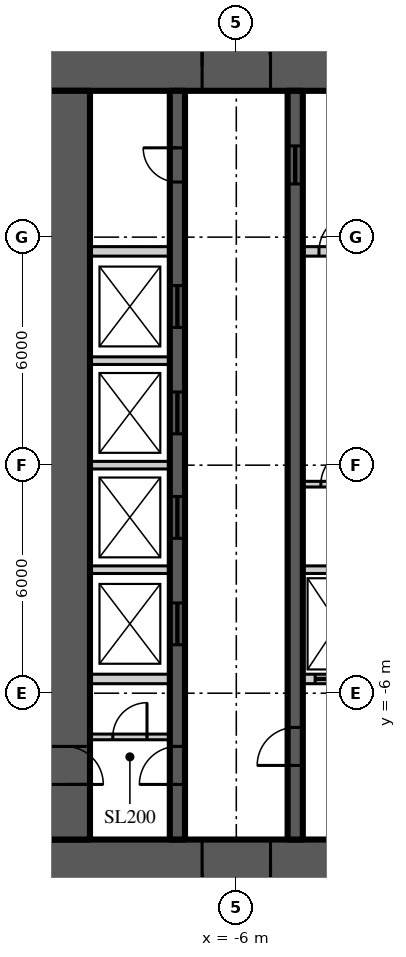
"""IFC4 building model, lengths in metres.
Left out: names, types, materials, properties, quantities, classifications, styles, units other than length and angle.
Written with IfcOpenShell. Run it as: python <this file> out.ifc"""

import sys

from ifc_helpers import new_model, si_unit, direction, frame, frame_2d, origin, place, context, subcontext, project, spatial, rectangle, extrude, element, fill, save


model = new_model("IFC4")
c1 = context("Model", 3, precision=1e-05, world=origin(), true_north=direction((0.0, 1.0)))
c2 = subcontext(c1, "Body", "Model", "MODEL_VIEW")
j1 = project(units=[si_unit("LENGTHUNIT", "METRE"), si_unit("PLANEANGLEUNIT", "RADIAN")], contexts=[c1])
p1 = place(None, origin())
s1 = spatial("IfcSite", under=j1, at=p1, CompositionType="ELEMENT")
p2 = place(p1, origin())
s2 = spatial("IfcBuilding", under=s1, at=p2, CompositionType="ELEMENT")
p3 = place(p2, frame((0.0, 0.0, 55.2)))
s3 = spatial("IfcBuildingStorey", under=s2, at=p3, CompositionType="ELEMENT", Elevation=55.2)
p4 = place(p3, frame((-11.15, 10.5, 0.0), z_axis=(0.0, 0.0, 1.0), x_axis=(1.0, 0.0, 0.0)))
e1 = element("IfcWall", 1, at=p4, inside=s3, PredefinedType="SHEAR", context=c2, shape_type="SweptSolid", body=[
    extrude(rectangle(XDim=22.3, YDim=1.3, at=frame_2d((11.15, 0.0))), origin(), (0.0, 0.0, 1.0), 3.9),
])
p5 = place(p4, frame((4.25, 0.0, 0.0)))
e2 = element("IfcOpeningElement", 2, at=p5, cuts=e1, PredefinedType="OPENING", context=c2, shape_type="SweptSolid", body=[
    extrude(rectangle(XDim=1.8, YDim=2.2, at=frame_2d((0.9, 1.1))), frame((0.0, 0.66, 0.0), z_axis=(0.0, -1.0, 0.0), x_axis=(1.0, 0.0, 0.0)), (0.0, 0.0, 1.0), 1.32),
])
p6 = place(p4, frame((16.25, 0.0, 0.0)))
e3 = element("IfcOpeningElement", 3, at=p6, cuts=e1, PredefinedType="OPENING", context=c2, shape_type="SweptSolid", body=[
    extrude(rectangle(XDim=1.8, YDim=2.2, at=frame_2d((0.9, 1.1))), frame((0.0, 0.66, 0.0), z_axis=(0.0, -1.0, 0.0), x_axis=(1.0, 0.0, 0.0)), (0.0, 0.0, 1.0), 1.32),
])
p7 = place(p3, frame((11.15, -10.5, 0.0), z_axis=(0.0, 0.0, 1.0), x_axis=(-1.0, 0.0, 0.0)))
e4 = element("IfcWall", 4, at=p7, inside=s3, PredefinedType="SHEAR", context=c2, shape_type="SweptSolid", body=[
    extrude(rectangle(XDim=22.3, YDim=1.3, at=frame_2d((11.15, 0.0))), origin(), (0.0, 0.0, 1.0), 3.9),
])
p8 = place(p7, frame((16.25, 0.0, 0.0)))
e5 = element("IfcOpeningElement", 5, at=p8, cuts=e4, PredefinedType="OPENING", context=c2, shape_type="SweptSolid", body=[
    extrude(rectangle(XDim=1.8, YDim=2.2, at=frame_2d((0.9, 1.1))), frame((0.0, 0.66, 0.0), z_axis=(0.0, -1.0, 0.0), x_axis=(1.0, 0.0, 0.0)), (0.0, 0.0, 1.0), 1.32),
])
p9 = place(p7, frame((4.25, 0.0, 0.0)))
e6 = element("IfcOpeningElement", 6, at=p9, cuts=e4, PredefinedType="OPENING", context=c2, shape_type="SweptSolid", body=[
    extrude(rectangle(XDim=1.8, YDim=2.2, at=frame_2d((0.9, 1.1))), frame((0.0, 0.66, 0.0), z_axis=(0.0, -1.0, 0.0), x_axis=(1.0, 0.0, 0.0)), (0.0, 0.0, 1.0), 1.32),
])
p10 = place(p3, frame((-10.5, 9.85, 0.0), z_axis=(0.0, 0.0, 1.0), x_axis=(0.0, -1.0, 0.0)))
e7 = element("IfcWall", 7, at=p10, inside=s3, PredefinedType="SHEAR", context=c2, shape_type="SweptSolid", body=[
    extrude(rectangle(XDim=19.7, YDim=1.3, at=frame_2d((9.85, 0.0))), origin(), (0.0, 0.0, 1.0), 3.9),
])
p11 = place(p10, frame((17.25, 0.0, 0.0)))
e8 = element("IfcOpeningElement", 8, at=p11, cuts=e7, PredefinedType="OPENING", context=c2, shape_type="SweptSolid", body=[
    extrude(rectangle(XDim=1.0, YDim=2.2, at=frame_2d((0.5, 1.1))), frame((0.0, 0.66, 0.0), z_axis=(0.0, -1.0, 0.0), x_axis=(1.0, 0.0, 0.0)), (0.0, 0.0, 1.0), 1.32),
])
p12 = place(p3, frame((-7.55, -9.85, 0.0), z_axis=(0.0, 0.0, 1.0), x_axis=(0.0, 1.0, 0.0)))
e9 = element("IfcWall", 9, at=p12, inside=s3, PredefinedType="SHEAR", context=c2, shape_type="SweptSolid", body=[
    extrude(rectangle(XDim=19.7, YDim=0.4, at=frame_2d((9.85, 0.0))), origin(), (0.0, 0.0, 1.0), 3.9),
])
p13 = place(p12, frame((1.45, 0.0, 0.0)))
e10 = element("IfcOpeningElement", 10, at=p13, cuts=e9, PredefinedType="OPENING", context=c2, shape_type="SweptSolid", body=[
    extrude(rectangle(XDim=1.0, YDim=2.2, at=frame_2d((0.5, 1.1))), frame((0.0, 0.21, 0.0), z_axis=(0.0, -1.0, 0.0), x_axis=(1.0, 0.0, 0.0)), (0.0, 0.0, 1.0), 0.42),
])
p14 = place(p12, frame((17.3, 0.0, 0.0)))
e11 = element("IfcOpeningElement", 11, at=p14, cuts=e9, PredefinedType="OPENING", context=c2, shape_type="SweptSolid", body=[
    extrude(rectangle(XDim=0.9, YDim=2.1, at=frame_2d((0.45, 1.05))), frame((0.0, 0.21, 0.0), z_axis=(0.0, -1.0, 0.0), x_axis=(1.0, 0.0, 0.0)), (0.0, 0.0, 1.0), 0.42),
])
p15 = place(p12, frame((5.125, 0.0, 0.0)))
e12 = element("IfcOpeningElement", 12, at=p15, cuts=e9, PredefinedType="OPENING", context=c2, shape_type="SweptSolid", body=[
    extrude(rectangle(XDim=1.1, YDim=2.2, at=frame_2d((0.55, 1.1))), frame((0.0, 0.21, 0.0), z_axis=(0.0, -1.0, 0.0), x_axis=(1.0, 0.0, 0.0)), (0.0, 0.0, 1.0), 0.42),
])
p16 = place(p12, frame((7.925, 0.0, 0.0)))
e13 = element("IfcOpeningElement", 13, at=p16, cuts=e9, PredefinedType="OPENING", context=c2, shape_type="SweptSolid", body=[
    extrude(rectangle(XDim=1.1, YDim=2.2, at=frame_2d((0.55, 1.1))), frame((0.0, 0.21, 0.0), z_axis=(0.0, -1.0, 0.0), x_axis=(1.0, 0.0, 0.0)), (0.0, 0.0, 1.0), 0.42),
])
p17 = place(p12, frame((10.675, 0.0, 0.0)))
e14 = element("IfcOpeningElement", 14, at=p17, cuts=e9, PredefinedType="OPENING", context=c2, shape_type="SweptSolid", body=[
    extrude(rectangle(XDim=1.1, YDim=2.2, at=frame_2d((0.55, 1.1))), frame((0.0, 0.21, 0.0), z_axis=(0.0, -1.0, 0.0), x_axis=(1.0, 0.0, 0.0)), (0.0, 0.0, 1.0), 0.42),
])
p18 = place(p12, frame((13.475, 0.0, 0.0)))
e15 = element("IfcOpeningElement", 15, at=p18, cuts=e9, PredefinedType="OPENING", context=c2, shape_type="SweptSolid", body=[
    extrude(rectangle(XDim=1.1, YDim=2.2, at=frame_2d((0.55, 1.1))), frame((0.0, 0.21, 0.0), z_axis=(0.0, -1.0, 0.0), x_axis=(1.0, 0.0, 0.0)), (0.0, 0.0, 1.0), 0.42),
])
p19 = place(p3, frame((-4.45, -9.85, 0.0), z_axis=(0.0, 0.0, 1.0), x_axis=(0.0, 1.0, 0.0)))
e16 = element("IfcWall", 16, at=p19, inside=s3, PredefinedType="SHEAR", context=c2, shape_type="SweptSolid", body=[
    extrude(rectangle(XDim=19.7, YDim=0.4, at=frame_2d((9.85, 0.0))), origin(), (0.0, 0.0, 1.0), 3.9),
])
p20 = place(p19, frame((1.95, 0.0, 0.0)))
e17 = element("IfcOpeningElement", 17, at=p20, cuts=e16, PredefinedType="OPENING", context=c2, shape_type="SweptSolid", body=[
    extrude(rectangle(XDim=1.0, YDim=2.2, at=frame_2d((0.5, 1.1))), frame((0.0, 0.21, 0.0), z_axis=(0.0, -1.0, 0.0), x_axis=(1.0, 0.0, 0.0)), (0.0, 0.0, 1.0), 0.42),
])
p21 = place(p19, frame((17.25, 0.0, 0.0)))
e18 = element("IfcOpeningElement", 18, at=p21, cuts=e16, PredefinedType="OPENING", context=c2, shape_type="SweptSolid", body=[
    extrude(rectangle(XDim=1.0, YDim=2.1, at=frame_2d((0.5, 1.05))), frame((0.0, 0.21, 0.0), z_axis=(0.0, -1.0, 0.0), x_axis=(1.0, 0.0, 0.0)), (0.0, 0.0, 1.0), 0.42),
])
p22 = place(p3, frame((-9.85, 5.625, 0.0), z_axis=(0.0, 0.0, 1.0), x_axis=(1.0, 0.0, 0.0)))
e19 = element("IfcWall", 19, at=p22, inside=s3, PredefinedType="SOLIDWALL", context=c2, shape_type="SweptSolid", body=[
    extrude(rectangle(XDim=2.1, YDim=0.25, at=frame_2d((1.05, 0.0))), origin(), (0.0, 0.0, 1.0), 3.7),
])
p23 = place(p3, frame((-4.25, 5.625, 0.0), z_axis=(0.0, 0.0, 1.0), x_axis=(1.0, 0.0, 0.0)))
e20 = element("IfcWall", 20, at=p23, inside=s3, PredefinedType="SOLIDWALL", context=c2, shape_type="SweptSolid", body=[
    extrude(rectangle(XDim=1.85, YDim=0.25, at=frame_2d((0.925, 0.0))), origin(), (0.0, 0.0, 1.0), 3.7),
])
p24 = place(p23, frame((0.425, 0.0, 0.0)))
e21 = element("IfcOpeningElement", 21, at=p24, cuts=e20, PredefinedType="OPENING", context=c2, shape_type="SweptSolid", body=[
    extrude(rectangle(XDim=1.0, YDim=2.2, at=frame_2d((0.5, 1.1))), frame((0.0, 0.135, 0.0), z_axis=(0.0, -1.0, 0.0), x_axis=(1.0, 0.0, 0.0)), (0.0, 0.0, 1.0), 0.27),
])
p25 = place(p3, frame((-9.85, -5.625, 0.0), z_axis=(0.0, 0.0, 1.0), x_axis=(1.0, 0.0, 0.0)))
e22 = element("IfcWall", 22, at=p25, inside=s3, PredefinedType="SOLIDWALL", context=c2, shape_type="SweptSolid", body=[
    extrude(rectangle(XDim=2.1, YDim=0.25, at=frame_2d((1.05, 0.0))), origin(), (0.0, 0.0, 1.0), 3.7),
])
p26 = place(p3, frame((-4.25, -5.625, 0.0), z_axis=(0.0, 0.0, 1.0), x_axis=(1.0, 0.0, 0.0)))
e23 = element("IfcWall", 23, at=p26, inside=s3, PredefinedType="SOLIDWALL", context=c2, shape_type="SweptSolid", body=[
    extrude(rectangle(XDim=1.85, YDim=0.25, at=frame_2d((0.925, 0.0))), origin(), (0.0, 0.0, 1.0), 3.7),
])
p27 = place(p26, frame((0.325, 0.0, 0.0)))
e24 = element("IfcOpeningElement", 24, at=p27, cuts=e23, PredefinedType="OPENING", context=c2, shape_type="SweptSolid", body=[
    extrude(rectangle(XDim=1.2, YDim=2.2, at=frame_2d((0.6, 1.1))), frame((0.0, 0.135, 0.0), z_axis=(0.0, -1.0, 0.0), x_axis=(1.0, 0.0, 0.0)), (0.0, 0.0, 1.0), 0.27),
])
p28 = place(p3, frame((-9.85, -2.75, 0.0), z_axis=(0.0, 0.0, 1.0), x_axis=(1.0, 0.0, 0.0)))
e25 = element("IfcWall", 25, at=p28, inside=s3, PredefinedType="SOLIDWALL", context=c2, shape_type="SweptSolid", body=[
    extrude(rectangle(XDim=2.1, YDim=0.2, at=frame_2d((1.05, 0.0))), origin(), (0.0, 0.0, 1.0), 3.7),
])
p29 = place(p3, frame((-4.25, -2.75, 0.0), z_axis=(0.0, 0.0, 1.0), x_axis=(1.0, 0.0, 0.0)))
e26 = element("IfcWall", 26, at=p29, inside=s3, PredefinedType="SOLIDWALL", context=c2, shape_type="SweptSolid", body=[
    extrude(rectangle(XDim=1.85, YDim=0.2, at=frame_2d((0.925, 0.0))), origin(), (0.0, 0.0, 1.0), 3.7),
])
for number, where, z_axis, x_axis in (
    (27, (-9.85, 0.0, 0.0), (0.0, 0.0, 1.0), (1.0, 0.0, 0.0)),
    (28, (-9.85, 2.75, 0.0), (0.0, 0.0, 1.0), (1.0, 0.0, 0.0)),
):
    element("IfcWall", number, at=place(p3, frame(where, z_axis=z_axis, x_axis=x_axis)), inside=s3, PredefinedType="SOLIDWALL", context=c2, shape_type="SweptSolid", body=[
        extrude(rectangle(XDim=2.1, YDim=0.2, at=frame_2d((1.05, 0.0))), origin(), (0.0, 0.0, 1.0), 3.7),
    ])
p30 = place(p3, frame((-4.25, -0.5, 0.0), z_axis=(0.0, 0.0, 1.0), x_axis=(1.0, 0.0, 0.0)))
e29 = element("IfcWall", 29, at=p30, inside=s3, PredefinedType="SOLIDWALL", context=c2, shape_type="SweptSolid", body=[
    extrude(rectangle(XDim=1.85, YDim=0.15, at=frame_2d((0.925, 0.0))), origin(), (0.0, 0.0, 1.0), 3.77),
])
p31 = place(p30, frame((0.475, 0.0, 0.0)))
e30 = element("IfcOpeningElement", 30, at=p31, cuts=e29, PredefinedType="OPENING", context=c2, shape_type="SweptSolid", body=[
    extrude(rectangle(XDim=0.9, YDim=2.1, at=frame_2d((0.45, 1.05))), frame((0.0, 0.085, 0.0), z_axis=(0.0, -1.0, 0.0), x_axis=(1.0, 0.0, 0.0)), (0.0, 0.0, 1.0), 0.17),
])
p32 = place(p3, frame((-9.85, -7.15, 0.0), z_axis=(0.0, 0.0, 1.0), x_axis=(1.0, 0.0, 0.0)))
e31 = element("IfcWall", 31, at=p32, inside=s3, PredefinedType="SOLIDWALL", context=c2, shape_type="SweptSolid", body=[
    extrude(rectangle(XDim=2.1, YDim=0.15, at=frame_2d((1.05, 0.0))), origin(), (0.0, 0.0, 1.0), 3.77),
])
p33 = place(p32, frame((0.6, 0.0, 0.0)))
e32 = element("IfcOpeningElement", 32, at=p33, cuts=e31, PredefinedType="OPENING", context=c2, shape_type="SweptSolid", body=[
    extrude(rectangle(XDim=0.9, YDim=2.1, at=frame_2d((0.45, 1.05))), frame((0.0, 0.085, 0.0), z_axis=(0.0, -1.0, 0.0), x_axis=(1.0, 0.0, 0.0)), (0.0, 0.0, 1.0), 0.17),
])
p34 = place(p5, origin())
e33 = element("IfcDoor", 33, at=p34, inside=s3, OperationType="DOUBLE_DOOR_DOUBLE_SWING", PredefinedType="DOOR", context=c2, shape_type="SweptSolid", body=[
    extrude(rectangle(XDim=1.8, YDim=2.2, at=frame_2d((0.9, 1.1))), frame((0.0, 0.025, 0.0), z_axis=(0.0, -1.0, 0.0), x_axis=(1.0, 0.0, 0.0)), (0.0, 0.0, 1.0), 0.05),
])
fill(e2, e33)
p35 = place(p8, origin())
e34 = element("IfcDoor", 34, at=p35, inside=s3, OperationType="DOUBLE_DOOR_DOUBLE_SWING", PredefinedType="DOOR", context=c2, shape_type="SweptSolid", body=[
    extrude(rectangle(XDim=1.8, YDim=2.2, at=frame_2d((0.9, 1.1))), frame((0.0, 0.025, 0.0), z_axis=(0.0, -1.0, 0.0), x_axis=(1.0, 0.0, 0.0)), (0.0, 0.0, 1.0), 0.05),
])
fill(e5, e34)
p36 = place(p13, origin())
e35 = element("IfcDoor", 35, at=p36, inside=s3, OperationType="SINGLE_SWING_LEFT", PredefinedType="DOOR", context=c2, shape_type="SweptSolid", body=[
    extrude(rectangle(XDim=1.0, YDim=2.2, at=frame_2d((0.5, 1.1))), frame((0.0, 0.025, 0.0), z_axis=(0.0, -1.0, 0.0), x_axis=(1.0, 0.0, 0.0)), (0.0, 0.0, 1.0), 0.05),
])
fill(e10, e35)
p37 = place(p11, origin())
e36 = element("IfcDoor", 36, at=p37, inside=s3, OperationType="SINGLE_SWING_RIGHT", PredefinedType="DOOR", context=c2, shape_type="SweptSolid", body=[
    extrude(rectangle(XDim=1.0, YDim=2.2, at=frame_2d((0.5, 1.1))), frame((0.0, 0.025, 0.0), z_axis=(0.0, -1.0, 0.0), x_axis=(1.0, 0.0, 0.0)), (0.0, 0.0, 1.0), 0.05),
])
fill(e8, e36)
p38 = place(p20, origin())
e37 = element("IfcDoor", 37, at=p38, inside=s3, OperationType="SINGLE_SWING_LEFT", PredefinedType="DOOR", context=c2, shape_type="SweptSolid", body=[
    extrude(rectangle(XDim=1.0, YDim=2.2, at=frame_2d((0.5, 1.1))), frame((0.0, 0.025, 0.0), z_axis=(0.0, -1.0, 0.0), x_axis=(1.0, 0.0, 0.0)), (0.0, 0.0, 1.0), 0.05),
])
fill(e17, e37)
p39 = place(p14, origin())
e38 = element("IfcDoor", 38, at=p39, inside=s3, OperationType="SINGLE_SWING_RIGHT", PredefinedType="DOOR", context=c2, shape_type="SweptSolid", body=[
    extrude(rectangle(XDim=0.9, YDim=2.1, at=frame_2d((0.45, 1.05))), frame((0.0, 0.025, 0.0), z_axis=(0.0, -1.0, 0.0), x_axis=(1.0, 0.0, 0.0)), (0.0, 0.0, 1.0), 0.05),
])
fill(e11, e38)
p40 = place(p21, origin())
e39 = element("IfcDoor", 39, at=p40, inside=s3, OperationType="SLIDING_TO_LEFT", PredefinedType="DOOR", context=c2, shape_type="SweptSolid", body=[
    extrude(rectangle(XDim=1.0, YDim=2.1, at=frame_2d((0.5, 1.05))), frame((0.0, 0.025, 0.0), z_axis=(0.0, -1.0, 0.0), x_axis=(1.0, 0.0, 0.0)), (0.0, 0.0, 1.0), 0.05),
])
fill(e18, e39)
p41 = place(p15, origin())
e40 = element("IfcDoor", 40, at=p41, inside=s3, OperationType="SLIDING_TO_LEFT", PredefinedType="DOOR", context=c2, shape_type="SweptSolid", body=[
    extrude(rectangle(XDim=1.1, YDim=2.2, at=frame_2d((0.55, 1.1))), frame((0.0, 0.025, 0.0), z_axis=(0.0, -1.0, 0.0), x_axis=(1.0, 0.0, 0.0)), (0.0, 0.0, 1.0), 0.05),
])
fill(e12, e40)
p42 = place(p16, origin())
e41 = element("IfcDoor", 41, at=p42, inside=s3, OperationType="SLIDING_TO_LEFT", PredefinedType="DOOR", context=c2, shape_type="SweptSolid", body=[
    extrude(rectangle(XDim=1.1, YDim=2.2, at=frame_2d((0.55, 1.1))), frame((0.0, 0.025, 0.0), z_axis=(0.0, -1.0, 0.0), x_axis=(1.0, 0.0, 0.0)), (0.0, 0.0, 1.0), 0.05),
])
fill(e13, e41)
p43 = place(p17, origin())
e42 = element("IfcDoor", 42, at=p43, inside=s3, OperationType="SLIDING_TO_LEFT", PredefinedType="DOOR", context=c2, shape_type="SweptSolid", body=[
    extrude(rectangle(XDim=1.1, YDim=2.2, at=frame_2d((0.55, 1.1))), frame((0.0, 0.025, 0.0), z_axis=(0.0, -1.0, 0.0), x_axis=(1.0, 0.0, 0.0)), (0.0, 0.0, 1.0), 0.05),
])
fill(e14, e42)
p44 = place(p18, origin())
e43 = element("IfcDoor", 43, at=p44, inside=s3, OperationType="SLIDING_TO_LEFT", PredefinedType="DOOR", context=c2, shape_type="SweptSolid", body=[
    extrude(rectangle(XDim=1.1, YDim=2.2, at=frame_2d((0.55, 1.1))), frame((0.0, 0.025, 0.0), z_axis=(0.0, -1.0, 0.0), x_axis=(1.0, 0.0, 0.0)), (0.0, 0.0, 1.0), 0.05),
])
fill(e15, e43)
p45 = place(p27, origin())
e44 = element("IfcDoor", 44, at=p45, inside=s3, OperationType="SLIDING_TO_LEFT", PredefinedType="DOOR", context=c2, shape_type="SweptSolid", body=[
    extrude(rectangle(XDim=1.2, YDim=2.2, at=frame_2d((0.6, 1.1))), frame((0.0, 0.025, 0.0), z_axis=(0.0, -1.0, 0.0), x_axis=(1.0, 0.0, 0.0)), (0.0, 0.0, 1.0), 0.05),
])
fill(e24, e44)
p46 = place(p31, origin())
e45 = element("IfcDoor", 45, at=p46, inside=s3, OperationType="SINGLE_SWING_RIGHT", PredefinedType="DOOR", context=c2, shape_type="SweptSolid", body=[
    extrude(rectangle(XDim=0.9, YDim=2.1, at=frame_2d((0.45, 1.05))), frame((0.0, 0.025, 0.0), z_axis=(0.0, -1.0, 0.0), x_axis=(1.0, 0.0, 0.0)), (0.0, 0.0, 1.0), 0.05),
])
fill(e30, e45)
p47 = place(p24, origin())
e46 = element("IfcDoor", 46, at=p47, inside=s3, OperationType="SINGLE_SWING_RIGHT", PredefinedType="DOOR", context=c2, shape_type="SweptSolid", body=[
    extrude(rectangle(XDim=1.0, YDim=2.2, at=frame_2d((0.5, 1.1))), frame((0.0, 0.025, 0.0), z_axis=(0.0, -1.0, 0.0), x_axis=(1.0, 0.0, 0.0)), (0.0, 0.0, 1.0), 0.05),
])
fill(e21, e46)
p48 = place(p33, origin())
e47 = element("IfcDoor", 47, at=p48, inside=s3, OperationType="SINGLE_SWING_RIGHT", PredefinedType="DOOR", context=c2, shape_type="SweptSolid", body=[
    extrude(rectangle(XDim=0.9, YDim=2.1, at=frame_2d((0.45, 1.05))), frame((0.0, 0.025, 0.0), z_axis=(0.0, -1.0, 0.0), x_axis=(1.0, 0.0, 0.0)), (0.0, 0.0, 1.0), 0.05),
])
fill(e32, e47)
save(model, sys.argv[1])
